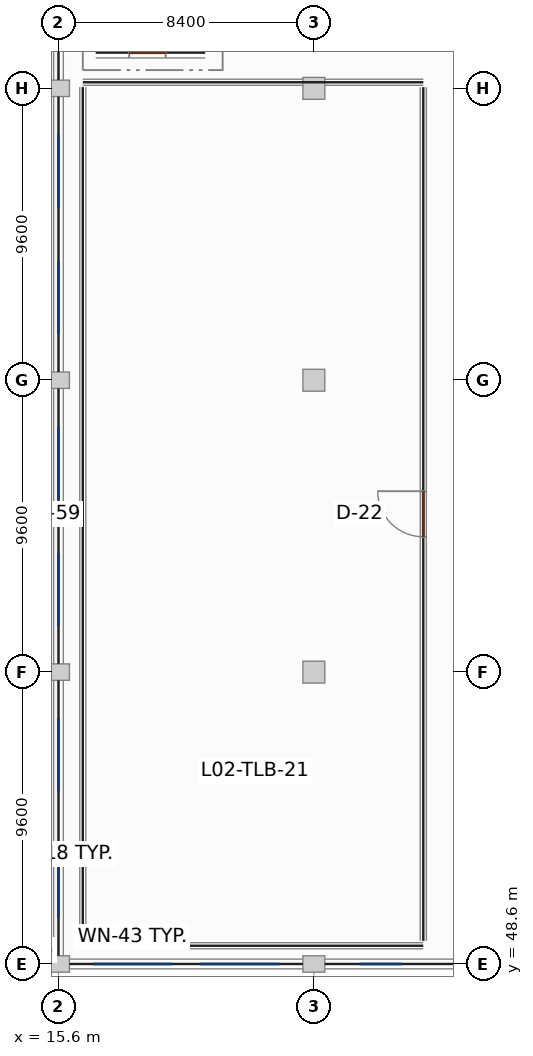
"""IFC4 building model, lengths in metres.
Left out: names, types, materials, properties, quantities, classifications, styles, units other than length and angle.
Written with IfcOpenShell. Run it as: python <this file> out.ifc"""

import sys

from ifc_helpers import new_model, si_unit, direction, frame, frame_2d, origin, origin_2d, place, context, subcontext, project, spatial, rectangle, extrude, element, fill, save


model = new_model("IFC4")
c1 = context("Model", 3, precision=1e-05, world=origin(), true_north=direction((0.0, 1.0)))
c2 = subcontext(c1, "Body", "Model", "MODEL_VIEW")
j1 = project(units=[si_unit("LENGTHUNIT", "METRE"), si_unit("PLANEANGLEUNIT", "RADIAN")], contexts=[c1])
p1 = place(None, origin())
s1 = spatial("IfcSite", under=j1, at=p1, CompositionType="ELEMENT")
p2 = place(p1, origin())
s2 = spatial("IfcBuilding", under=s1, at=p2, CompositionType="ELEMENT")
p3 = place(p2, frame((0.0, 0.0, 9.9)))
s3 = spatial("IfcBuildingStorey", under=s2, at=p3, CompositionType="ELEMENT", Elevation=9.9)
for number, where, z_axis, x_axis in (
    (1, (15.6, 48.6, 0.0), (0.0, 0.0, 1.0), (1.0, 0.0, 0.0)),
    (2, (15.6, 58.2, 0.0), (0.0, 0.0, 1.0), (1.0, 0.0, 0.0)),
    (3, (15.6, 67.8, 0.0), (0.0, 0.0, 1.0), (1.0, 0.0, 0.0)),
    (4, (15.6, 77.4, 0.0), (0.0, 0.0, 1.0), (1.0, 0.0, 0.0)),
    (5, (24.0, 48.6, 0.0), (0.0, 0.0, 1.0), (1.0, 0.0, 0.0)),
):
    element("IfcColumn", number, at=place(p3, frame(where, z_axis=z_axis, x_axis=x_axis)), inside=s3, PredefinedType="COLUMN", context=c2, shape_type="SweptSolid", body=[
        extrude(rectangle(XDim=0.72, YDim=0.54, at=origin_2d()), origin(), (0.0, 0.0, 1.0), 3.9),
    ])
for number, where, z_axis, x_axis in (
    (6, (24.0, 58.2, 0.0), (0.0, 0.0, 1.0), (1.0, 0.0, 0.0)),
    (7, (24.0, 67.8, 0.0), (0.0, 0.0, 1.0), (1.0, 0.0, 0.0)),
    (8, (24.0, 77.4, 0.0), (0.0, 0.0, 1.0), (1.0, 0.0, 0.0)),
):
    element("IfcColumn", number, at=place(p3, frame(where, z_axis=z_axis, x_axis=x_axis)), inside=s3, PredefinedType="COLUMN", context=c2, shape_type="SweptSolid", body=[
        extrude(rectangle(XDim=0.72, YDim=0.72, at=origin_2d()), origin(), (0.0, 0.0, 1.0), 3.9),
    ])
p4 = place(p3, frame((15.962, 48.6, 0.0), z_axis=(0.0, 0.0, 1.0), x_axis=(1.0, 0.0, 0.0)))
e9 = element("IfcWall", 9, at=p4, inside=s3, PredefinedType="SOLIDWALL", context=c2, shape_type="SweptSolid", body=[
    extrude(rectangle(XDim=7.676, YDim=0.32, at=frame_2d((3.838, 0.0))), origin(), (0.0, 0.0, 1.0), 3.08),
])
p5 = place(p4, frame((0.772, 0.0, 0.85)))
e10 = element("IfcOpeningElement", 10, at=p5, cuts=e9, PredefinedType="OPENING", context=c2, shape_type="SweptSolid", body=[
    extrude(rectangle(XDim=2.6, YDim=1.95, at=frame_2d((1.3, 0.975))), frame((0.0, 0.17, 0.0), z_axis=(0.0, -1.0, 0.0), x_axis=(1.0, 0.0, 0.0)), (0.0, 0.0, 1.0), 0.34),
])
p6 = place(p4, frame((4.303, 0.0, 0.85)))
e11 = element("IfcOpeningElement", 11, at=p6, cuts=e9, PredefinedType="OPENING", context=c2, shape_type="SweptSolid", body=[
    extrude(rectangle(XDim=2.6, YDim=1.95, at=frame_2d((1.3, 0.975))), frame((0.0, 0.17, 0.0), z_axis=(0.0, -1.0, 0.0), x_axis=(1.0, 0.0, 0.0)), (0.0, 0.0, 1.0), 0.34),
])
p7 = place(p3, frame((24.362, 48.6, 0.0), z_axis=(0.0, 0.0, 1.0), x_axis=(1.0, 0.0, 0.0)))
e12 = element("IfcWall", 12, at=p7, inside=s3, PredefinedType="SOLIDWALL", context=c2, shape_type="SweptSolid", body=[
    extrude(rectangle(XDim=7.676, YDim=0.32, at=frame_2d((3.838, 0.0))), origin(), (0.0, 0.0, 1.0), 3.08),
])
p8 = place(p7, frame((1.142, 0.0, 0.85)))
e13 = element("IfcOpeningElement", 13, at=p8, cuts=e12, PredefinedType="OPENING", context=c2, shape_type="SweptSolid", body=[
    extrude(rectangle(XDim=1.4, YDim=1.65, at=frame_2d((0.7, 0.825))), frame((0.0, 0.17, 0.0), z_axis=(0.0, -1.0, 0.0), x_axis=(1.0, 0.0, 0.0)), (0.0, 0.0, 1.0), 0.34),
])
p9 = place(p3, frame((15.6, 48.872, 0.0), z_axis=(0.0, 0.0, 1.0), x_axis=(0.0, 1.0, 0.0)))
e14 = element("IfcWall", 14, at=p9, inside=s3, PredefinedType="SOLIDWALL", context=c2, shape_type="SweptSolid", body=[
    extrude(rectangle(XDim=9.056, YDim=0.32, at=frame_2d((4.528, 0.0))), origin(), (0.0, 0.0, 1.0), 3.08),
])
p10 = place(p9, frame((1.245, 0.0, 0.85)))
e15 = element("IfcOpeningElement", 15, at=p10, cuts=e14, PredefinedType="OPENING", context=c2, shape_type="SweptSolid", body=[
    extrude(rectangle(XDim=2.4, YDim=1.95, at=frame_2d((1.2, 0.975))), frame((0.0, 0.17, 0.0), z_axis=(0.0, -1.0, 0.0), x_axis=(1.0, 0.0, 0.0)), (0.0, 0.0, 1.0), 0.34),
])
p11 = place(p9, frame((5.411, 0.0, 0.85)))
e16 = element("IfcOpeningElement", 16, at=p11, cuts=e14, PredefinedType="OPENING", context=c2, shape_type="SweptSolid", body=[
    extrude(rectangle(XDim=2.4, YDim=1.95, at=frame_2d((1.2, 0.975))), frame((0.0, 0.17, 0.0), z_axis=(0.0, -1.0, 0.0), x_axis=(1.0, 0.0, 0.0)), (0.0, 0.0, 1.0), 0.34),
])
p12 = place(p3, frame((15.6, 58.472, 0.0), z_axis=(0.0, 0.0, 1.0), x_axis=(0.0, 1.0, 0.0)))
e17 = element("IfcWall", 17, at=p12, inside=s3, PredefinedType="SOLIDWALL", context=c2, shape_type="SweptSolid", body=[
    extrude(rectangle(XDim=9.056, YDim=0.32, at=frame_2d((4.528, 0.0))), origin(), (0.0, 0.0, 1.0), 3.08),
])
p13 = place(p12, frame((1.245, 0.0, 0.85)))
e18 = element("IfcOpeningElement", 18, at=p13, cuts=e17, PredefinedType="OPENING", context=c2, shape_type="SweptSolid", body=[
    extrude(rectangle(XDim=2.4, YDim=1.95, at=frame_2d((1.2, 0.975))), frame((0.0, 0.17, 0.0), z_axis=(0.0, -1.0, 0.0), x_axis=(1.0, 0.0, 0.0)), (0.0, 0.0, 1.0), 0.34),
])
p14 = place(p12, frame((5.411, 0.0, 0.85)))
e19 = element("IfcOpeningElement", 19, at=p14, cuts=e17, PredefinedType="OPENING", context=c2, shape_type="SweptSolid", body=[
    extrude(rectangle(XDim=2.4, YDim=1.95, at=frame_2d((1.2, 0.975))), frame((0.0, 0.17, 0.0), z_axis=(0.0, -1.0, 0.0), x_axis=(1.0, 0.0, 0.0)), (0.0, 0.0, 1.0), 0.34),
])
p15 = place(p3, frame((15.6, 68.072, 0.0), z_axis=(0.0, 0.0, 1.0), x_axis=(0.0, 1.0, 0.0)))
e20 = element("IfcWall", 20, at=p15, inside=s3, PredefinedType="SOLIDWALL", context=c2, shape_type="SweptSolid", body=[
    extrude(rectangle(XDim=9.056, YDim=0.32, at=frame_2d((4.528, 0.0))), origin(), (0.0, 0.0, 1.0), 3.08),
])
p16 = place(p15, frame((1.245, 0.0, 0.85)))
e21 = element("IfcOpeningElement", 21, at=p16, cuts=e20, PredefinedType="OPENING", context=c2, shape_type="SweptSolid", body=[
    extrude(rectangle(XDim=2.4, YDim=1.95, at=frame_2d((1.2, 0.975))), frame((0.0, 0.17, 0.0), z_axis=(0.0, -1.0, 0.0), x_axis=(1.0, 0.0, 0.0)), (0.0, 0.0, 1.0), 0.34),
])
p17 = place(p15, frame((5.411, 0.0, 0.85)))
e22 = element("IfcOpeningElement", 22, at=p17, cuts=e20, PredefinedType="OPENING", context=c2, shape_type="SweptSolid", body=[
    extrude(rectangle(XDim=2.4, YDim=1.95, at=frame_2d((1.2, 0.975))), frame((0.0, 0.17, 0.0), z_axis=(0.0, -1.0, 0.0), x_axis=(1.0, 0.0, 0.0)), (0.0, 0.0, 1.0), 0.34),
])
p18 = place(p3, frame((15.6, 77.672, 0.0), z_axis=(0.0, 0.0, 1.0), x_axis=(0.0, 1.0, 0.0)))
e23 = element("IfcWall", 23, at=p18, inside=s3, PredefinedType="SOLIDWALL", context=c2, shape_type="SweptSolid", body=[
    extrude(rectangle(XDim=8.976, YDim=0.32, at=frame_2d((4.488, 0.0))), origin(), (0.0, 0.0, 1.0), 3.08),
])
p19 = place(p18, frame((1.223, 0.0, 0.85)))
e24 = element("IfcOpeningElement", 24, at=p19, cuts=e23, PredefinedType="OPENING", context=c2, shape_type="SweptSolid", body=[
    extrude(rectangle(XDim=2.4, YDim=1.95, at=frame_2d((1.2, 0.975))), frame((0.0, 0.17, 0.0), z_axis=(0.0, -1.0, 0.0), x_axis=(1.0, 0.0, 0.0)), (0.0, 0.0, 1.0), 0.34),
])
p20 = place(p18, frame((5.353, 0.0, 0.85)))
e25 = element("IfcOpeningElement", 25, at=p20, cuts=e23, PredefinedType="OPENING", context=c2, shape_type="SweptSolid", body=[
    extrude(rectangle(XDim=2.4, YDim=1.95, at=frame_2d((1.2, 0.975))), frame((0.0, 0.17, 0.0), z_axis=(0.0, -1.0, 0.0), x_axis=(1.0, 0.0, 0.0)), (0.0, 0.0, 1.0), 0.34),
])
p21 = place(p3, frame((16.825, 78.575, 0.0), z_axis=(0.0, 0.0, 1.0), x_axis=(1.0, 0.0, 0.0)))
e26 = element("IfcWall", 26, at=p21, inside=s3, PredefinedType="SHEAR", context=c2, shape_type="SweptSolid", body=[
    extrude(rectangle(XDim=3.6, YDim=0.35, at=frame_2d((1.8, 0.0))), origin(), (0.0, 0.0, 1.0), 3.9),
])
p22 = place(p21, frame((1.1, 0.0, 0.0)))
e27 = element("IfcOpeningElement", 27, at=p22, cuts=e26, PredefinedType="OPENING", context=c2, shape_type="SweptSolid", body=[
    extrude(rectangle(XDim=1.2, YDim=2.2, at=frame_2d((0.6, 1.1))), frame((0.0, 0.185, 0.0), z_axis=(0.0, -1.0, 0.0), x_axis=(1.0, 0.0, 0.0)), (0.0, 0.0, 1.0), 0.37),
])
for number, where, z_axis, x_axis in (
    (28, (16.4, 49.2, 0.0), (0.0, 0.0, 1.0), (1.0, 0.0, 0.0)),
    (29, (16.4, 77.6, 0.0), (0.0, 0.0, 1.0), (1.0, 0.0, 0.0)),
):
    element("IfcWall", number, at=place(p3, frame(where, z_axis=z_axis, x_axis=x_axis)), inside=s3, PredefinedType="PARTITIONING", context=c2, shape_type="SweptSolid", body=[
        extrude(rectangle(XDim=11.2, YDim=0.2, at=frame_2d((5.6, 0.0))), origin(), (0.0, 0.0, 1.0), 2.92),
    ])
p23 = place(p3, frame((16.4, 49.36, 0.0), z_axis=(0.0, 0.0, 1.0), x_axis=(0.0, 1.0, 0.0)))
e30 = element("IfcWall", 30, at=p23, inside=s3, PredefinedType="PARTITIONING", context=c2, shape_type="SweptSolid", body=[
    extrude(rectangle(XDim=28.08, YDim=0.2, at=frame_2d((14.04, 0.0))), origin(), (0.0, 0.0, 1.0), 2.92),
])
p24 = place(p3, frame((27.6, 49.36, 0.0), z_axis=(0.0, 0.0, 1.0), x_axis=(0.0, 1.0, 0.0)))
e31 = element("IfcWall", 31, at=p24, inside=s3, PredefinedType="PARTITIONING", context=c2, shape_type="SweptSolid", body=[
    extrude(rectangle(XDim=28.08, YDim=0.2, at=frame_2d((14.04, 0.0))), origin(), (0.0, 0.0, 1.0), 2.92),
])
p25 = place(p24, frame((13.29, 0.0, 0.0)))
e32 = element("IfcOpeningElement", 32, at=p25, cuts=e31, PredefinedType="OPENING", context=c2, shape_type="SweptSolid", body=[
    extrude(rectangle(XDim=1.5, YDim=2.2, at=frame_2d((0.75, 1.1))), frame((0.0, 0.11, 0.0), z_axis=(0.0, -1.0, 0.0), x_axis=(1.0, 0.0, 0.0)), (0.0, 0.0, 1.0), 0.22),
])
p26 = place(p5, origin())
e33 = element("IfcWindow", 33, at=p26, inside=s3, PartitioningType="SINGLE_PANEL", PredefinedType="WINDOW", context=c2, shape_type="SweptSolid", body=[
    extrude(rectangle(XDim=2.6, YDim=1.95, at=frame_2d((1.3, 0.975))), frame((0.0, 0.03, 0.0), z_axis=(0.0, -1.0, 0.0), x_axis=(1.0, 0.0, 0.0)), (0.0, 0.0, 1.0), 0.06),
])
fill(e10, e33)
p27 = place(p6, origin())
e34 = element("IfcWindow", 34, at=p27, inside=s3, PartitioningType="SINGLE_PANEL", PredefinedType="WINDOW", context=c2, shape_type="SweptSolid", body=[
    extrude(rectangle(XDim=2.6, YDim=1.95, at=frame_2d((1.3, 0.975))), frame((0.0, 0.03, 0.0), z_axis=(0.0, -1.0, 0.0), x_axis=(1.0, 0.0, 0.0)), (0.0, 0.0, 1.0), 0.06),
])
fill(e11, e34)
p28 = place(p8, origin())
e35 = element("IfcWindow", 35, at=p28, inside=s3, PartitioningType="SINGLE_PANEL", PredefinedType="WINDOW", context=c2, shape_type="SweptSolid", body=[
    extrude(rectangle(XDim=1.4, YDim=1.65, at=frame_2d((0.7, 0.825))), frame((0.0, 0.03, 0.0), z_axis=(0.0, -1.0, 0.0), x_axis=(1.0, 0.0, 0.0)), (0.0, 0.0, 1.0), 0.06),
])
fill(e13, e35)
p29 = place(p10, origin())
e36 = element("IfcWindow", 36, at=p29, inside=s3, PartitioningType="SINGLE_PANEL", PredefinedType="WINDOW", context=c2, shape_type="SweptSolid", body=[
    extrude(rectangle(XDim=2.4, YDim=1.95, at=frame_2d((1.2, 0.975))), frame((0.0, 0.03, 0.0), z_axis=(0.0, -1.0, 0.0), x_axis=(1.0, 0.0, 0.0)), (0.0, 0.0, 1.0), 0.06),
])
fill(e15, e36)
p30 = place(p11, origin())
e37 = element("IfcWindow", 37, at=p30, inside=s3, PartitioningType="SINGLE_PANEL", PredefinedType="WINDOW", context=c2, shape_type="SweptSolid", body=[
    extrude(rectangle(XDim=2.4, YDim=1.95, at=frame_2d((1.2, 0.975))), frame((0.0, 0.03, 0.0), z_axis=(0.0, -1.0, 0.0), x_axis=(1.0, 0.0, 0.0)), (0.0, 0.0, 1.0), 0.06),
])
fill(e16, e37)
p31 = place(p13, origin())
e38 = element("IfcWindow", 38, at=p31, inside=s3, PartitioningType="SINGLE_PANEL", PredefinedType="WINDOW", context=c2, shape_type="SweptSolid", body=[
    extrude(rectangle(XDim=2.4, YDim=1.95, at=frame_2d((1.2, 0.975))), frame((0.0, 0.03, 0.0), z_axis=(0.0, -1.0, 0.0), x_axis=(1.0, 0.0, 0.0)), (0.0, 0.0, 1.0), 0.06),
])
fill(e18, e38)
p32 = place(p14, origin())
e39 = element("IfcWindow", 39, at=p32, inside=s3, PartitioningType="SINGLE_PANEL", PredefinedType="WINDOW", context=c2, shape_type="SweptSolid", body=[
    extrude(rectangle(XDim=2.4, YDim=1.95, at=frame_2d((1.2, 0.975))), frame((0.0, 0.03, 0.0), z_axis=(0.0, -1.0, 0.0), x_axis=(1.0, 0.0, 0.0)), (0.0, 0.0, 1.0), 0.06),
])
fill(e19, e39)
p33 = place(p16, origin())
e40 = element("IfcWindow", 40, at=p33, inside=s3, PartitioningType="SINGLE_PANEL", PredefinedType="WINDOW", context=c2, shape_type="SweptSolid", body=[
    extrude(rectangle(XDim=2.4, YDim=1.95, at=frame_2d((1.2, 0.975))), frame((0.0, 0.03, 0.0), z_axis=(0.0, -1.0, 0.0), x_axis=(1.0, 0.0, 0.0)), (0.0, 0.0, 1.0), 0.06),
])
fill(e21, e40)
p34 = place(p17, origin())
e41 = element("IfcWindow", 41, at=p34, inside=s3, PartitioningType="SINGLE_PANEL", PredefinedType="WINDOW", context=c2, shape_type="SweptSolid", body=[
    extrude(rectangle(XDim=2.4, YDim=1.95, at=frame_2d((1.2, 0.975))), frame((0.0, 0.03, 0.0), z_axis=(0.0, -1.0, 0.0), x_axis=(1.0, 0.0, 0.0)), (0.0, 0.0, 1.0), 0.06),
])
fill(e22, e41)
p35 = place(p22, origin())
e42 = element("IfcDoor", 42, at=p35, inside=s3, OperationType="SINGLE_SWING_LEFT", PredefinedType="DOOR", context=c2, shape_type="SweptSolid", body=[
    extrude(rectangle(XDim=1.2, YDim=2.2, at=frame_2d((0.6, 1.1))), frame((0.0, 0.025, 0.0), z_axis=(0.0, -1.0, 0.0), x_axis=(1.0, 0.0, 0.0)), (0.0, 0.0, 1.0), 0.05),
])
fill(e27, e42)
p36 = place(p25, origin())
e43 = element("IfcDoor", 43, at=p36, inside=s3, OperationType="SINGLE_SWING_RIGHT", PredefinedType="DOOR", context=c2, shape_type="SweptSolid", body=[
    extrude(rectangle(XDim=1.5, YDim=2.2, at=frame_2d((0.75, 1.1))), frame((0.0, 0.025, 0.0), z_axis=(0.0, -1.0, 0.0), x_axis=(1.0, 0.0, 0.0)), (0.0, 0.0, 1.0), 0.05),
])
fill(e32, e43)
save(model, sys.argv[1])
